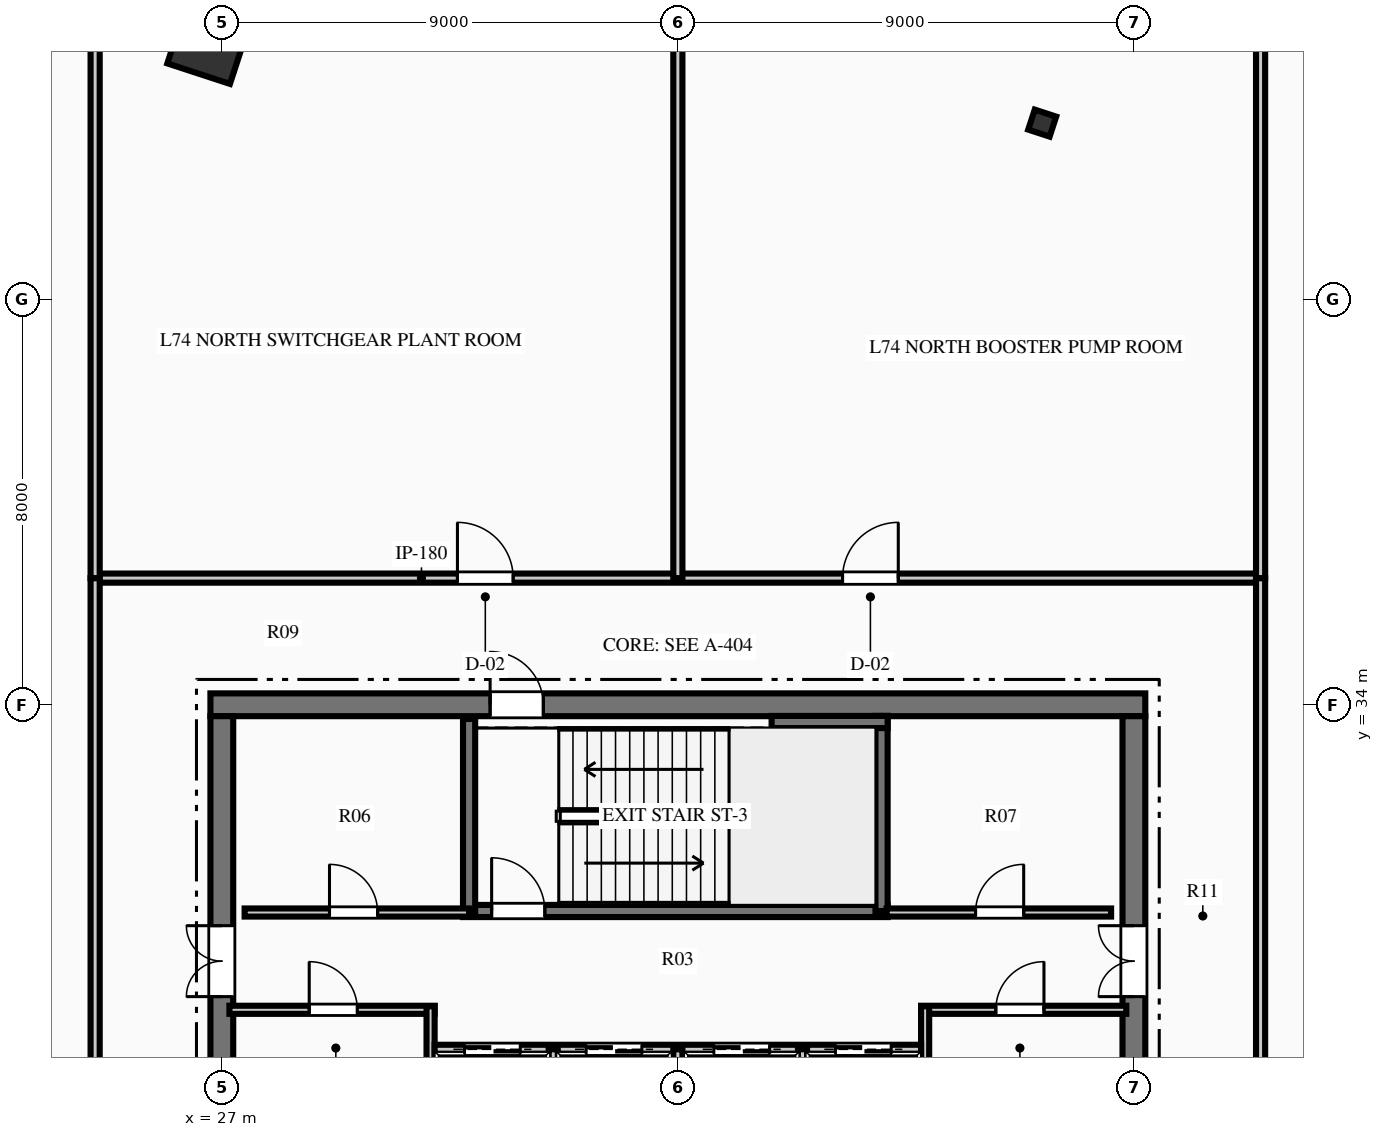
"""IFC4 building model, lengths in metres.
Left out: names, types, materials, properties, quantities, classifications, styles, units other than length and angle.
Written with IfcOpenShell. Run it as: python <this file> out.ifc"""

import sys

from ifc_helpers import new_model, si_unit, direction, frame, frame_2d, origin, origin_2d, place, context, subcontext, project, spatial, rectangle, hollow_rectangle, i_section, extrude, element, fill, save


model = new_model("IFC4")
c1 = context("Model", 3, precision=1e-05, world=origin(), true_north=direction((0.0, 1.0)))
c2 = subcontext(c1, "Body", "Model", "MODEL_VIEW")
j1 = project(units=[si_unit("LENGTHUNIT", "METRE"), si_unit("PLANEANGLEUNIT", "RADIAN")], contexts=[c1])
p1 = place(None, origin())
s1 = spatial("IfcSite", under=j1, at=p1, CompositionType="ELEMENT")
p2 = place(p1, origin())
s2 = spatial("IfcBuilding", under=s1, at=p2, CompositionType="ELEMENT")
p3 = place(p2, frame((0.0, 0.0, 293.7)))
s3 = spatial("IfcBuildingStorey", under=s2, at=p3, CompositionType="ELEMENT", Elevation=293.7)
p4 = place(p3, frame((26.775, 34.0, 0.0), z_axis=(0.0, 0.0, 1.0), x_axis=(1.0, 0.0, 0.0)))
e1 = element("IfcWall", 1, at=p4, inside=s3, PredefinedType="SHEAR", context=c2, shape_type="SweptSolid", body=[
    extrude(rectangle(XDim=18.45, YDim=0.45, at=frame_2d((9.225, 0.0))), origin(), (0.0, 0.0, 1.0), 4.5),
])
p5 = place(p4, frame((5.52, 0.0, 0.0)))
e2 = element("IfcOpeningElement", 2, at=p5, cuts=e1, PredefinedType="OPENING", context=c2, shape_type="SweptSolid", body=[
    extrude(rectangle(XDim=1.05, YDim=2.15, at=frame_2d((0.525, 1.075))), frame((0.0, 0.235, 0.0), z_axis=(0.0, -1.0, 0.0), x_axis=(1.0, 0.0, 0.0)), (0.0, 0.0, 1.0), 0.47),
])
p6 = place(p3, frame((27.0, 18.225, 0.0), z_axis=(0.0, 0.0, 1.0), x_axis=(0.0, 1.0, 0.0)))
e3 = element("IfcWall", 3, at=p6, inside=s3, PredefinedType="SHEAR", context=c2, shape_type="SweptSolid", body=[
    extrude(rectangle(XDim=15.55, YDim=0.45, at=frame_2d((7.775, 0.0))), origin(), (0.0, 0.0, 1.0), 4.5),
])
p7 = place(p6, frame((10.015, 0.0, 0.0)))
e4 = element("IfcOpeningElement", 4, at=p7, cuts=e3, PredefinedType="OPENING", context=c2, shape_type="SweptSolid", body=[
    extrude(rectangle(XDim=1.4, YDim=2.2, at=frame_2d((0.7, 1.1))), frame((0.0, 0.235, 0.0), z_axis=(0.0, -1.0, 0.0), x_axis=(1.0, 0.0, 0.0)), (0.0, 0.0, 1.0), 0.47),
])
p8 = place(p3, frame((45.0, 18.225, 0.0), z_axis=(0.0, 0.0, 1.0), x_axis=(0.0, 1.0, 0.0)))
e5 = element("IfcWall", 5, at=p8, inside=s3, PredefinedType="SHEAR", context=c2, shape_type="SweptSolid", body=[
    extrude(rectangle(XDim=15.55, YDim=0.45, at=frame_2d((7.775, 0.0))), origin(), (0.0, 0.0, 1.0), 4.5),
])
p9 = place(p8, frame((10.015, 0.0, 0.0)))
e6 = element("IfcOpeningElement", 6, at=p9, cuts=e5, PredefinedType="OPENING", context=c2, shape_type="SweptSolid", body=[
    extrude(rectangle(XDim=1.4, YDim=2.2, at=frame_2d((0.7, 1.1))), frame((0.0, 0.235, 0.0), z_axis=(0.0, -1.0, 0.0), x_axis=(1.0, 0.0, 0.0)), (0.0, 0.0, 1.0), 0.47),
])
p10 = place(p3, frame((31.76, 29.93, 0.0), z_axis=(0.0, 0.0, 1.0), x_axis=(1.0, 0.0, 0.0)))
e7 = element("IfcWall", 7, at=p10, inside=s3, PredefinedType="SHEAR", context=c2, shape_type="SweptSolid", body=[
    extrude(rectangle(XDim=8.38, YDim=0.24, at=frame_2d((4.19, 0.0))), origin(), (0.0, 0.0, 1.0), 4.5),
])
p11 = place(p10, frame((0.565, 0.0, 0.0)))
e8 = element("IfcOpeningElement", 8, at=p11, cuts=e7, PredefinedType="OPENING", context=c2, shape_type="SweptSolid", body=[
    extrude(rectangle(XDim=1.05, YDim=2.15, at=frame_2d((0.525, 1.075))), frame((0.0, 0.13, 0.0), z_axis=(0.0, -1.0, 0.0), x_axis=(1.0, 0.0, 0.0)), (0.0, 0.0, 1.0), 0.26),
])
p12 = place(p3, frame((31.88, 29.93, 0.0), z_axis=(0.0, 0.0, 1.0), x_axis=(0.0, 1.0, 0.0)))
e9 = element("IfcWall", 9, at=p12, inside=s3, PredefinedType="SHEAR", context=c2, shape_type="SweptSolid", body=[
    extrude(rectangle(XDim=3.79, YDim=0.24, at=frame_2d((1.895, 0.0))), origin(), (0.0, 0.0, 1.0), 4.5),
])
p13 = place(p3, frame((40.02, 29.93, 0.0), z_axis=(0.0, 0.0, 1.0), x_axis=(0.0, 1.0, 0.0)))
e10 = element("IfcWall", 10, at=p13, inside=s3, PredefinedType="SHEAR", context=c2, shape_type="SweptSolid", body=[
    extrude(rectangle(XDim=3.85, YDim=0.24, at=frame_2d((1.925, 0.0))), origin(), (0.0, 0.0, 1.0), 4.5),
])
p14 = place(p3, frame((37.85, 33.66, 0.0), z_axis=(0.0, 0.0, 1.0), x_axis=(1.0, 0.0, 0.0)))
e11 = element("IfcWall", 11, at=p14, inside=s3, PredefinedType="SHEAR", context=c2, shape_type="SweptSolid", body=[
    extrude(rectangle(XDim=2.29, YDim=0.24, at=frame_2d((1.145, 0.0))), origin(), (0.0, 0.0, 1.0), 4.5),
])
p15 = place(p3, frame((26.745, 47.073, 0.0), z_axis=(0.0, 0.0, 1.0), x_axis=(0.311008203279, 0.950407227189, 0.0)))
e12 = element("IfcColumn", 12, at=p15, inside=s3, PredefinedType="COLUMN", context=c2, shape_type="SweptSolid", body=[
    extrude(hollow_rectangle(XDim=1.3, YDim=1.3, WallThickness=0.06, at=origin_2d()), origin(), (0.0, 0.0, 1.0), 4.5),
])
p16 = place(p3, frame((43.19, 45.48, 0.0), z_axis=(0.0, 0.0, 1.0), x_axis=(0.311008203279, 0.950407227189, 0.0)))
e13 = element("IfcColumn", 13, at=p16, inside=s3, PredefinedType="COLUMN", context=c2, shape_type="SweptSolid", body=[
    extrude(i_section(OverallWidth=0.416, OverallDepth=0.445, WebThickness=0.039, FlangeThickness=0.063, at=origin_2d()), origin(), (0.0, 0.0, 1.0), 4.5),
])
p17 = place(p3, frame((41.034, 48.507, 0.0), z_axis=(0.0, 0.0, 1.0), x_axis=(0.982775363915, -0.184804177662, 0.0)))
e14 = element("IfcWall", 14, at=p17, inside=s3, PredefinedType="STANDARD", context=c2, shape_type="SweptSolid", body=[
    extrude(rectangle(XDim=18.238, YDim=0.28, at=frame_2d((9.119, 0.0))), origin(), (0.0, 0.0, 1.0), 1.15),
])
p18 = place(p3, frame((27.15, 27.98, 0.0), z_axis=(0.0, 0.0, 1.0), x_axis=(1.0, 0.0, 0.0)))
e15 = element("IfcWall", 15, at=p18, inside=s3, PredefinedType="PARTITIONING", context=c2, shape_type="SweptSolid", body=[
    extrude(rectangle(XDim=4.05, YDim=0.16, at=frame_2d((2.025, 0.0))), origin(), (0.0, 0.0, 1.0), 4.1),
])
p19 = place(p18, frame((1.575, 0.0, 0.0)))
e16 = element("IfcOpeningElement", 16, at=p19, cuts=e15, PredefinedType="OPENING", context=c2, shape_type="SweptSolid", body=[
    extrude(rectangle(XDim=0.95, YDim=2.15, at=frame_2d((0.475, 1.075))), frame((0.0, 0.09, 0.0), z_axis=(0.0, -1.0, 0.0), x_axis=(1.0, 0.0, 0.0)), (0.0, 0.0, 1.0), 0.18),
])
p20 = place(p3, frame((31.12, 26.54, 0.0), z_axis=(0.0, 0.0, 1.0), x_axis=(0.0, 1.0, 0.0)))
e17 = element("IfcWall", 17, at=p20, inside=s3, PredefinedType="PARTITIONING", context=c2, shape_type="SweptSolid", body=[
    extrude(rectangle(XDim=1.51, YDim=0.16, at=frame_2d((0.755, 0.0))), origin(), (0.0, 0.0, 1.0), 4.1),
])
p21 = place(p3, frame((40.8, 27.98, 0.0), z_axis=(0.0, 0.0, 1.0), x_axis=(1.0, 0.0, 0.0)))
e18 = element("IfcWall", 18, at=p21, inside=s3, PredefinedType="PARTITIONING", context=c2, shape_type="SweptSolid", body=[
    extrude(rectangle(XDim=4.05, YDim=0.16, at=frame_2d((2.025, 0.0))), origin(), (0.0, 0.0, 1.0), 4.1),
])
p22 = place(p21, frame((1.475, 0.0, 0.0)))
e19 = element("IfcOpeningElement", 19, at=p22, cuts=e18, PredefinedType="OPENING", context=c2, shape_type="SweptSolid", body=[
    extrude(rectangle(XDim=0.95, YDim=2.15, at=frame_2d((0.475, 1.075))), frame((0.0, 0.09, 0.0), z_axis=(0.0, -1.0, 0.0), x_axis=(1.0, 0.0, 0.0)), (0.0, 0.0, 1.0), 0.18),
])
p23 = place(p3, frame((40.88, 26.54, 0.0), z_axis=(0.0, 0.0, 1.0), x_axis=(0.0, 1.0, 0.0)))
e20 = element("IfcWall", 20, at=p23, inside=s3, PredefinedType="PARTITIONING", context=c2, shape_type="SweptSolid", body=[
    extrude(rectangle(XDim=1.51, YDim=0.16, at=frame_2d((0.755, 0.0))), origin(), (0.0, 0.0, 1.0), 4.1),
])
p24 = place(p3, frame((27.45, 29.9, 0.0), z_axis=(0.0, 0.0, 1.0), x_axis=(1.0, 0.0, 0.0)))
e21 = element("IfcWall", 21, at=p24, inside=s3, PredefinedType="PARTITIONING", context=c2, shape_type="SweptSolid", body=[
    extrude(rectangle(XDim=4.43, YDim=0.16, at=frame_2d((2.215, 0.0))), origin(), (0.0, 0.0, 1.0), 4.1),
])
p25 = place(p24, frame((1.675, 0.0, 0.0)))
e22 = element("IfcOpeningElement", 22, at=p25, cuts=e21, PredefinedType="OPENING", context=c2, shape_type="SweptSolid", body=[
    extrude(rectangle(XDim=0.95, YDim=2.15, at=frame_2d((0.475, 1.075))), frame((0.0, 0.09, 0.0), z_axis=(0.0, -1.0, 0.0), x_axis=(1.0, 0.0, 0.0)), (0.0, 0.0, 1.0), 0.18),
])
p26 = place(p3, frame((40.12, 29.9, 0.0), z_axis=(0.0, 0.0, 1.0), x_axis=(1.0, 0.0, 0.0)))
e23 = element("IfcWall", 23, at=p26, inside=s3, PredefinedType="PARTITIONING", context=c2, shape_type="SweptSolid", body=[
    extrude(rectangle(XDim=4.43, YDim=0.16, at=frame_2d((2.215, 0.0))), origin(), (0.0, 0.0, 1.0), 4.1),
])
p27 = place(p26, frame((1.755, 0.0, 0.0)))
e24 = element("IfcOpeningElement", 24, at=p27, cuts=e23, PredefinedType="OPENING", context=c2, shape_type="SweptSolid", body=[
    extrude(rectangle(XDim=0.95, YDim=2.15, at=frame_2d((0.475, 1.075))), frame((0.0, 0.09, 0.0), z_axis=(0.0, -1.0, 0.0), x_axis=(1.0, 0.0, 0.0)), (0.0, 0.0, 1.0), 0.18),
])
p28 = place(p3, frame((31.2, 27.2, 0.0), z_axis=(0.0, 0.0, 1.0), x_axis=(1.0, 0.0, 0.0)))
e25 = element("IfcWall", 25, at=p28, inside=s3, PredefinedType="PARTITIONING", context=c2, shape_type="SweptSolid", body=[
    extrude(rectangle(XDim=9.6, YDim=0.18, at=frame_2d((4.8, 0.0))), origin(), (0.0, 0.0, 1.0), 4.1),
])
p29 = place(p28, frame((0.59, 0.0, 0.0)))
e26 = element("IfcOpeningElement", 26, at=p29, cuts=e25, PredefinedType="OPENING", context=c2, shape_type="SweptSolid", body=[
    extrude(rectangle(XDim=1.1, YDim=2.15, at=frame_2d((0.55, 1.075))), frame((0.0, 0.1, 0.0), z_axis=(0.0, -1.0, 0.0), x_axis=(1.0, 0.0, 0.0)), (0.0, 0.0, 1.0), 0.2),
])
p30 = place(p28, frame((2.99, 0.0, 0.0)))
e27 = element("IfcOpeningElement", 27, at=p30, cuts=e25, PredefinedType="OPENING", context=c2, shape_type="SweptSolid", body=[
    extrude(rectangle(XDim=1.1, YDim=2.15, at=frame_2d((0.55, 1.075))), frame((0.0, 0.1, 0.0), z_axis=(0.0, -1.0, 0.0), x_axis=(1.0, 0.0, 0.0)), (0.0, 0.0, 1.0), 0.2),
])
p31 = place(p28, frame((5.51, 0.0, 0.0)))
e28 = element("IfcOpeningElement", 28, at=p31, cuts=e25, PredefinedType="OPENING", context=c2, shape_type="SweptSolid", body=[
    extrude(rectangle(XDim=1.1, YDim=2.15, at=frame_2d((0.55, 1.075))), frame((0.0, 0.1, 0.0), z_axis=(0.0, -1.0, 0.0), x_axis=(1.0, 0.0, 0.0)), (0.0, 0.0, 1.0), 0.2),
])
p32 = place(p28, frame((7.91, 0.0, 0.0)))
e29 = element("IfcOpeningElement", 29, at=p32, cuts=e25, PredefinedType="OPENING", context=c2, shape_type="SweptSolid", body=[
    extrude(rectangle(XDim=1.1, YDim=2.15, at=frame_2d((0.55, 1.075))), frame((0.0, 0.1, 0.0), z_axis=(0.0, -1.0, 0.0), x_axis=(1.0, 0.0, 0.0)), (0.0, 0.0, 1.0), 0.2),
])
for number, where, z_axis, x_axis in (
    (30, (33.54, 25.3, 0.0), (0.0, 0.0, 1.0), (0.0, 1.0, 0.0)),
    (31, (36.0, 25.3, 0.0), (0.0, 0.0, 1.0), (0.0, 1.0, 0.0)),
    (32, (38.46, 25.3, 0.0), (0.0, 0.0, 1.0), (0.0, 1.0, 0.0)),
):
    element("IfcWall", number, at=place(p3, frame(where, z_axis=z_axis, x_axis=x_axis)), inside=s3, PredefinedType="PARTITIONING", context=c2, shape_type="SweptSolid", body=[
        extrude(rectangle(XDim=1.9, YDim=0.18, at=frame_2d((0.95, 0.0))), origin(), (0.0, 0.0, 1.0), 4.1),
    ])
p33 = place(p3, frame((24.5, 36.5, 0.0), z_axis=(0.0, 0.0, 1.0), x_axis=(1.0, 0.0, 0.0)))
e33 = element("IfcWall", 33, at=p33, inside=s3, PredefinedType="PARTITIONING", context=c2, shape_type="SweptSolid", body=[
    extrude(rectangle(XDim=23.0, YDim=0.18, at=frame_2d((11.5, 0.0))), origin(), (0.0, 0.0, 1.0), 4.1),
])
p34 = place(p33, frame((7.15, 0.0, 0.0)))
e34 = element("IfcOpeningElement", 34, at=p34, cuts=e33, PredefinedType="OPENING", context=c2, shape_type="SweptSolid", body=[
    extrude(rectangle(XDim=1.1, YDim=2.15, at=frame_2d((0.55, 1.075))), frame((0.0, 0.1, 0.0), z_axis=(0.0, -1.0, 0.0), x_axis=(1.0, 0.0, 0.0)), (0.0, 0.0, 1.0), 0.2),
])
p35 = place(p33, frame((14.75, 0.0, 0.0)))
e35 = element("IfcOpeningElement", 35, at=p35, cuts=e33, PredefinedType="OPENING", context=c2, shape_type="SweptSolid", body=[
    extrude(rectangle(XDim=1.1, YDim=2.15, at=frame_2d((0.55, 1.075))), frame((0.0, 0.1, 0.0), z_axis=(0.0, -1.0, 0.0), x_axis=(1.0, 0.0, 0.0)), (0.0, 0.0, 1.0), 0.2),
])
p36 = place(p3, frame((24.5, 15.5, 0.0), z_axis=(0.0, 0.0, 1.0), x_axis=(0.0, 1.0, 0.0)))
e36 = element("IfcWall", 36, at=p36, inside=s3, PredefinedType="PARTITIONING", context=c2, shape_type="SweptSolid", body=[
    extrude(rectangle(XDim=21.0, YDim=0.18, at=frame_2d((10.5, 0.0))), origin(), (0.0, 0.0, 1.0), 4.1),
])
p37 = place(p36, frame((7.0, 0.0, 0.0)))
e37 = element("IfcOpeningElement", 37, at=p37, cuts=e36, PredefinedType="OPENING", context=c2, shape_type="SweptSolid", body=[
    extrude(rectangle(XDim=1.4, YDim=2.2, at=frame_2d((0.7, 1.1))), frame((0.0, 0.1, 0.0), z_axis=(0.0, -1.0, 0.0), x_axis=(1.0, 0.0, 0.0)), (0.0, 0.0, 1.0), 0.2),
])
p38 = place(p3, frame((47.5, 15.5, 0.0), z_axis=(0.0, 0.0, 1.0), x_axis=(0.0, 1.0, 0.0)))
e38 = element("IfcWall", 38, at=p38, inside=s3, PredefinedType="PARTITIONING", context=c2, shape_type="SweptSolid", body=[
    extrude(rectangle(XDim=21.0, YDim=0.18, at=frame_2d((10.5, 0.0))), origin(), (0.0, 0.0, 1.0), 4.1),
])
p39 = place(p38, frame((7.0, 0.0, 0.0)))
e39 = element("IfcOpeningElement", 39, at=p39, cuts=e38, PredefinedType="OPENING", context=c2, shape_type="SweptSolid", body=[
    extrude(rectangle(XDim=1.4, YDim=2.2, at=frame_2d((0.7, 1.1))), frame((0.0, 0.1, 0.0), z_axis=(0.0, -1.0, 0.0), x_axis=(1.0, 0.0, 0.0)), (0.0, 0.0, 1.0), 0.2),
])
p40 = place(p3, frame((36.0, 36.5, 0.0), z_axis=(0.0, 0.0, 1.0), x_axis=(0.0, 1.0, 0.0)))
e40 = element("IfcWall", 40, at=p40, inside=s3, PredefinedType="PARTITIONING", context=c2, shape_type="SweptSolid", body=[
    extrude(rectangle(XDim=12.913, YDim=0.18, at=frame_2d((6.457, 0.0))), origin(), (0.0, 0.0, 1.0), 4.1),
])
p41 = place(p3, frame((24.5, 36.5, 0.0), z_axis=(0.0, 0.0, 1.0), x_axis=(0.0, 1.0, 0.0)))
e41 = element("IfcWall", 41, at=p41, inside=s3, PredefinedType="PARTITIONING", context=c2, shape_type="SweptSolid", body=[
    extrude(rectangle(XDim=15.076, YDim=0.18, at=frame_2d((7.538, 0.0))), origin(), (0.0, 0.0, 1.0), 4.1),
])
p42 = place(p3, frame((47.5, 36.5, 0.0), z_axis=(0.0, 0.0, 1.0), x_axis=(0.0, 1.0, 0.0)))
e42 = element("IfcWall", 42, at=p42, inside=s3, PredefinedType="PARTITIONING", context=c2, shape_type="SweptSolid", body=[
    extrude(rectangle(XDim=10.751, YDim=0.18, at=frame_2d((5.375, 0.0))), origin(), (0.0, 0.0, 1.0), 3.478),
])
p43 = place(p19, origin())
e43 = element("IfcDoor", 43, at=p43, inside=s3, OperationType="SINGLE_SWING_LEFT", PredefinedType="DOOR", context=c2, shape_type="SweptSolid", body=[
    extrude(rectangle(XDim=0.95, YDim=2.15, at=frame_2d((0.475, 1.075))), frame((0.0, 0.025, 0.0), z_axis=(0.0, -1.0, 0.0), x_axis=(1.0, 0.0, 0.0)), (0.0, 0.0, 1.0), 0.05),
])
fill(e16, e43)
p44 = place(p22, origin())
e44 = element("IfcDoor", 44, at=p44, inside=s3, OperationType="SINGLE_SWING_RIGHT", PredefinedType="DOOR", context=c2, shape_type="SweptSolid", body=[
    extrude(rectangle(XDim=0.95, YDim=2.15, at=frame_2d((0.475, 1.075))), frame((0.0, 0.025, 0.0), z_axis=(0.0, -1.0, 0.0), x_axis=(1.0, 0.0, 0.0)), (0.0, 0.0, 1.0), 0.05),
])
fill(e19, e44)
p45 = place(p25, origin())
e45 = element("IfcDoor", 45, at=p45, inside=s3, OperationType="SINGLE_SWING_LEFT", PredefinedType="DOOR", context=c2, shape_type="SweptSolid", body=[
    extrude(rectangle(XDim=0.95, YDim=2.15, at=frame_2d((0.475, 1.075))), frame((0.0, 0.025, 0.0), z_axis=(0.0, -1.0, 0.0), x_axis=(1.0, 0.0, 0.0)), (0.0, 0.0, 1.0), 0.05),
])
fill(e22, e45)
p46 = place(p27, origin())
e46 = element("IfcDoor", 46, at=p46, inside=s3, OperationType="SINGLE_SWING_RIGHT", PredefinedType="DOOR", context=c2, shape_type="SweptSolid", body=[
    extrude(rectangle(XDim=0.95, YDim=2.15, at=frame_2d((0.475, 1.075))), frame((0.0, 0.025, 0.0), z_axis=(0.0, -1.0, 0.0), x_axis=(1.0, 0.0, 0.0)), (0.0, 0.0, 1.0), 0.05),
])
fill(e24, e46)
p47 = place(p11, origin())
e47 = element("IfcDoor", 47, at=p47, inside=s3, OperationType="SINGLE_SWING_LEFT", PredefinedType="DOOR", context=c2, shape_type="SweptSolid", body=[
    extrude(rectangle(XDim=1.05, YDim=2.15, at=frame_2d((0.525, 1.075))), frame((0.0, 0.025, 0.0), z_axis=(0.0, -1.0, 0.0), x_axis=(1.0, 0.0, 0.0)), (0.0, 0.0, 1.0), 0.05),
])
fill(e8, e47)
p48 = place(p7, origin())
e48 = element("IfcDoor", 48, at=p48, inside=s3, OperationType="DOUBLE_DOOR_SINGLE_SWING", PredefinedType="DOOR", context=c2, shape_type="SweptSolid", body=[
    extrude(rectangle(XDim=1.4, YDim=2.2, at=frame_2d((0.7, 1.1))), frame((0.0, 0.025, 0.0), z_axis=(0.0, -1.0, 0.0), x_axis=(1.0, 0.0, 0.0)), (0.0, 0.0, 1.0), 0.05),
])
fill(e4, e48)
p49 = place(p9, origin())
e49 = element("IfcDoor", 49, at=p49, inside=s3, OperationType="DOUBLE_DOOR_SINGLE_SWING", PredefinedType="DOOR", context=c2, shape_type="SweptSolid", body=[
    extrude(rectangle(XDim=1.4, YDim=2.2, at=frame_2d((0.7, 1.1))), frame((0.0, 0.025, 0.0), z_axis=(0.0, -1.0, 0.0), x_axis=(1.0, 0.0, 0.0)), (0.0, 0.0, 1.0), 0.05),
])
fill(e6, e49)
p50 = place(p34, origin())
e50 = element("IfcDoor", 50, at=p50, inside=s3, OperationType="SINGLE_SWING_LEFT", PredefinedType="DOOR", context=c2, shape_type="SweptSolid", body=[
    extrude(rectangle(XDim=1.1, YDim=2.15, at=frame_2d((0.55, 1.075))), frame((0.0, 0.025, 0.0), z_axis=(0.0, -1.0, 0.0), x_axis=(1.0, 0.0, 0.0)), (0.0, 0.0, 1.0), 0.05),
])
fill(e34, e50)
p51 = place(p35, origin())
e51 = element("IfcDoor", 51, at=p51, inside=s3, OperationType="SINGLE_SWING_RIGHT", PredefinedType="DOOR", context=c2, shape_type="SweptSolid", body=[
    extrude(rectangle(XDim=1.1, YDim=2.15, at=frame_2d((0.55, 1.075))), frame((0.0, 0.025, 0.0), z_axis=(0.0, -1.0, 0.0), x_axis=(1.0, 0.0, 0.0)), (0.0, 0.0, 1.0), 0.05),
])
fill(e35, e51)
p52 = place(p5, origin())
e52 = element("IfcDoor", 52, at=p52, inside=s3, OperationType="SINGLE_SWING_LEFT", PredefinedType="DOOR", context=c2, shape_type="SweptSolid", body=[
    extrude(rectangle(XDim=1.05, YDim=2.15, at=frame_2d((0.525, 1.075))), frame((0.0, 0.025, 0.0), z_axis=(0.0, -1.0, 0.0), x_axis=(1.0, 0.0, 0.0)), (0.0, 0.0, 1.0), 0.05),
])
fill(e2, e52)
p53 = place(p29, origin())
e53 = element("IfcDoor", 53, at=p53, inside=s3, OperationType="SLIDING_TO_LEFT", PredefinedType="DOOR", context=c2, shape_type="SweptSolid", body=[
    extrude(rectangle(XDim=1.1, YDim=2.15, at=frame_2d((0.55, 1.075))), frame((0.0, 0.025, 0.0), z_axis=(0.0, -1.0, 0.0), x_axis=(1.0, 0.0, 0.0)), (0.0, 0.0, 1.0), 0.05),
])
fill(e26, e53)
p54 = place(p30, origin())
e54 = element("IfcDoor", 54, at=p54, inside=s3, OperationType="SLIDING_TO_LEFT", PredefinedType="DOOR", context=c2, shape_type="SweptSolid", body=[
    extrude(rectangle(XDim=1.1, YDim=2.15, at=frame_2d((0.55, 1.075))), frame((0.0, 0.025, 0.0), z_axis=(0.0, -1.0, 0.0), x_axis=(1.0, 0.0, 0.0)), (0.0, 0.0, 1.0), 0.05),
])
fill(e27, e54)
p55 = place(p31, origin())
e55 = element("IfcDoor", 55, at=p55, inside=s3, OperationType="SLIDING_TO_LEFT", PredefinedType="DOOR", context=c2, shape_type="SweptSolid", body=[
    extrude(rectangle(XDim=1.1, YDim=2.15, at=frame_2d((0.55, 1.075))), frame((0.0, 0.025, 0.0), z_axis=(0.0, -1.0, 0.0), x_axis=(1.0, 0.0, 0.0)), (0.0, 0.0, 1.0), 0.05),
])
fill(e28, e55)
p56 = place(p32, origin())
e56 = element("IfcDoor", 56, at=p56, inside=s3, OperationType="SLIDING_TO_LEFT", PredefinedType="DOOR", context=c2, shape_type="SweptSolid", body=[
    extrude(rectangle(XDim=1.1, YDim=2.15, at=frame_2d((0.55, 1.075))), frame((0.0, 0.025, 0.0), z_axis=(0.0, -1.0, 0.0), x_axis=(1.0, 0.0, 0.0)), (0.0, 0.0, 1.0), 0.05),
])
fill(e29, e56)
save(model, sys.argv[1])
